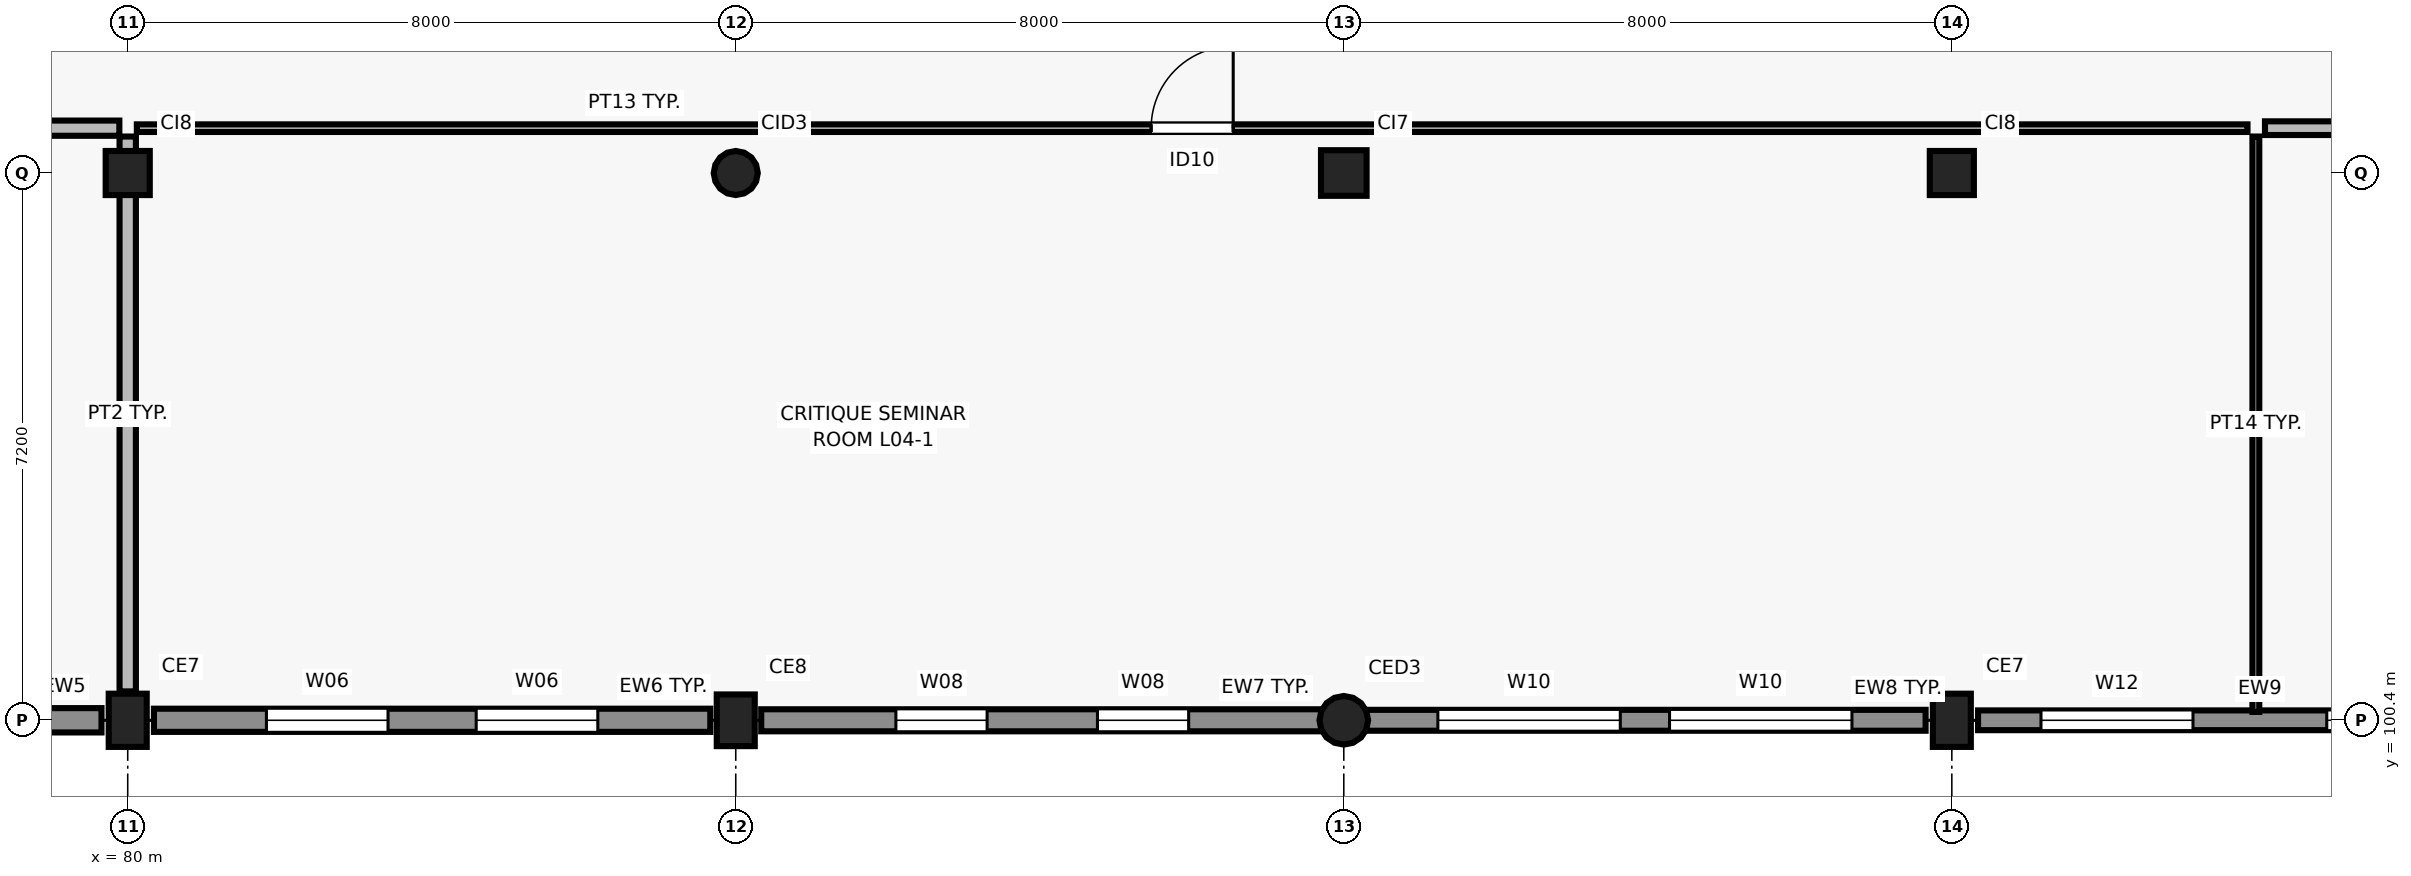
"""IFC4 building model, lengths in metres.
Left out: names, types, materials, properties, quantities, classifications, styles, units other than length and angle.
Written with IfcOpenShell. Run it as: python <this file> out.ifc"""

import sys

from ifc_helpers import new_model, si_unit, direction, frame, frame_2d, origin, origin_2d, place, context, subcontext, project, spatial, rectangle, circle, extrude, element, fill, save


model = new_model("IFC4")
c1 = context("Model", 3, precision=1e-05, world=origin(), true_north=direction((0.0, 1.0)))
c2 = subcontext(c1, "Body", "Model", "MODEL_VIEW")
j1 = project(units=[si_unit("LENGTHUNIT", "METRE"), si_unit("PLANEANGLEUNIT", "RADIAN")], contexts=[c1])
p1 = place(None, origin())
s1 = spatial("IfcSite", under=j1, at=p1, CompositionType="ELEMENT")
p2 = place(p1, origin())
s2 = spatial("IfcBuilding", under=s1, at=p2, CompositionType="ELEMENT")
p3 = place(p2, frame((0.0, 0.0, 17.4)))
s3 = spatial("IfcBuildingStorey", under=s2, at=p3, CompositionType="ELEMENT", Elevation=17.4)
p4 = place(p3, frame((80.0, 100.4, 0.0), z_axis=(0.0, 0.0, 1.0), x_axis=(1.0, 0.0, 0.0)))
e1 = element("IfcColumn", 1, at=p4, inside=s3, PredefinedType="COLUMN", context=c2, shape_type="SweptSolid", body=[
    extrude(rectangle(XDim=0.7, YDim=0.5, at=origin_2d()), origin(), (0.0, 0.0, 1.0), 4.2),
])
p5 = place(p3, frame((80.0, 107.6, 0.0), z_axis=(0.0, 0.0, 1.0), x_axis=(1.0, 0.0, 0.0)))
e2 = element("IfcColumn", 2, at=p5, inside=s3, PredefinedType="COLUMN", context=c2, shape_type="SweptSolid", body=[
    extrude(rectangle(XDim=0.58, YDim=0.58, at=origin_2d()), origin(), (0.0, 0.0, 1.0), 4.2),
])
p6 = place(p3, frame((88.0, 100.4, 0.0), z_axis=(0.0, 0.0, 1.0), x_axis=(1.0, 0.0, 0.0)))
e3 = element("IfcColumn", 3, at=p6, inside=s3, PredefinedType="COLUMN", context=c2, shape_type="SweptSolid", body=[
    extrude(rectangle(XDim=0.68, YDim=0.5, at=origin_2d()), origin(), (0.0, 0.0, 1.0), 4.2),
])
p7 = place(p3, frame((88.0, 107.6, 0.0), z_axis=(0.0, 0.0, 1.0), x_axis=(1.0, 0.0, 0.0)))
e4 = element("IfcColumn", 4, at=p7, inside=s3, PredefinedType="COLUMN", context=c2, shape_type="SweptSolid", body=[
    extrude(circle(Radius=0.29, at=origin_2d()), origin(), (0.0, 0.0, 1.0), 4.2),
])
p8 = place(p3, frame((96.0, 100.4, 0.0), z_axis=(0.0, 0.0, 1.0), x_axis=(1.0, 0.0, 0.0)))
e5 = element("IfcColumn", 5, at=p8, inside=s3, PredefinedType="COLUMN", context=c2, shape_type="SweptSolid", body=[
    extrude(circle(Radius=0.32, at=origin_2d()), origin(), (0.0, 0.0, 1.0), 4.2),
])
p9 = place(p3, frame((96.0, 107.6, 0.0), z_axis=(0.0, 0.0, 1.0), x_axis=(1.0, 0.0, 0.0)))
e6 = element("IfcColumn", 6, at=p9, inside=s3, PredefinedType="COLUMN", context=c2, shape_type="SweptSolid", body=[
    extrude(rectangle(XDim=0.6, YDim=0.6, at=origin_2d()), origin(), (0.0, 0.0, 1.0), 4.2),
])
p10 = place(p3, frame((104.0, 100.4, 0.0), z_axis=(0.0, 0.0, 1.0), x_axis=(1.0, 0.0, 0.0)))
e7 = element("IfcColumn", 7, at=p10, inside=s3, PredefinedType="COLUMN", context=c2, shape_type="SweptSolid", body=[
    extrude(rectangle(XDim=0.7, YDim=0.5, at=origin_2d()), origin(), (0.0, 0.0, 1.0), 4.2),
])
p11 = place(p3, frame((104.0, 107.6, 0.0), z_axis=(0.0, 0.0, 1.0), x_axis=(1.0, 0.0, 0.0)))
e8 = element("IfcColumn", 8, at=p11, inside=s3, PredefinedType="COLUMN", context=c2, shape_type="SweptSolid", body=[
    extrude(rectangle(XDim=0.58, YDim=0.58, at=origin_2d()), origin(), (0.0, 0.0, 1.0), 4.2),
])
p12 = place(p3, frame((72.269, 100.4, 0.0), z_axis=(0.0, 0.0, 1.0), x_axis=(1.0, 0.0, 0.0)))
e9 = element("IfcWall", 9, at=p12, inside=s3, PredefinedType="SOLIDWALL", context=c2, shape_type="SweptSolid", body=[
    extrude(rectangle(XDim=7.386, YDim=0.32, at=frame_2d((3.693, 0.0))), origin(), (0.0, 0.0, 1.0), 3.37),
])
p13 = place(p12, frame((1.235, 0.0, 0.9)))
e10 = element("IfcOpeningElement", 10, at=p13, cuts=e9, PredefinedType="OPENING", context=c2, shape_type="SweptSolid", body=[
    extrude(rectangle(XDim=2.0, YDim=1.8, at=frame_2d((1.0, 0.9))), frame((0.0, 0.17, 0.0), z_axis=(0.0, -1.0, 0.0), x_axis=(1.0, 0.0, 0.0)), (0.0, 0.0, 1.0), 0.34),
])
p14 = place(p12, frame((4.151, 0.0, 0.9)))
e11 = element("IfcOpeningElement", 11, at=p14, cuts=e9, PredefinedType="OPENING", context=c2, shape_type="SweptSolid", body=[
    extrude(rectangle(XDim=2.0, YDim=1.8, at=frame_2d((1.0, 0.9))), frame((0.0, 0.17, 0.0), z_axis=(0.0, -1.0, 0.0), x_axis=(1.0, 0.0, 0.0)), (0.0, 0.0, 1.0), 0.34),
])
p15 = place(p3, frame((80.345, 100.4, 0.0), z_axis=(0.0, 0.0, 1.0), x_axis=(1.0, 0.0, 0.0)))
e12 = element("IfcWall", 12, at=p15, inside=s3, PredefinedType="SOLIDWALL", context=c2, shape_type="SweptSolid", body=[
    extrude(rectangle(XDim=7.32, YDim=0.305, at=frame_2d((3.66, 0.0))), origin(), (0.0, 0.0, 1.0), 3.37),
])
p16 = place(p15, frame((1.48, 0.0, 0.9)))
e13 = element("IfcOpeningElement", 13, at=p16, cuts=e12, PredefinedType="OPENING", context=c2, shape_type="SweptSolid", body=[
    extrude(rectangle(XDim=1.6, YDim=1.8, at=frame_2d((0.8, 0.9))), frame((0.0, 0.162, 0.0), z_axis=(0.0, -1.0, 0.0), x_axis=(1.0, 0.0, 0.0)), (0.0, 0.0, 1.0), 0.325),
])
p17 = place(p15, frame((4.24, 0.0, 0.9)))
e14 = element("IfcOpeningElement", 14, at=p17, cuts=e12, PredefinedType="OPENING", context=c2, shape_type="SweptSolid", body=[
    extrude(rectangle(XDim=1.6, YDim=1.8, at=frame_2d((0.8, 0.9))), frame((0.0, 0.162, 0.0), z_axis=(0.0, -1.0, 0.0), x_axis=(1.0, 0.0, 0.0)), (0.0, 0.0, 1.0), 0.325),
])
p18 = place(p3, frame((88.335, 100.4, 0.0), z_axis=(0.0, 0.0, 1.0), x_axis=(1.0, 0.0, 0.0)))
e15 = element("IfcWall", 15, at=p18, inside=s3, PredefinedType="SOLIDWALL", context=c2, shape_type="SweptSolid", body=[
    extrude(rectangle(XDim=7.396, YDim=0.29, at=frame_2d((3.698, 0.0))), origin(), (0.0, 0.0, 1.0), 3.37),
])
p19 = place(p18, frame((1.772, 0.0, 0.9)))
e16 = element("IfcOpeningElement", 16, at=p19, cuts=e15, PredefinedType="OPENING", context=c2, shape_type="SweptSolid", body=[
    extrude(rectangle(XDim=1.2, YDim=1.8, at=frame_2d((0.6, 0.9))), frame((0.0, 0.155, 0.0), z_axis=(0.0, -1.0, 0.0), x_axis=(1.0, 0.0, 0.0)), (0.0, 0.0, 1.0), 0.31),
])
p20 = place(p18, frame((4.424, 0.0, 0.9)))
e17 = element("IfcOpeningElement", 17, at=p20, cuts=e15, PredefinedType="OPENING", context=c2, shape_type="SweptSolid", body=[
    extrude(rectangle(XDim=1.2, YDim=1.8, at=frame_2d((0.6, 0.9))), frame((0.0, 0.155, 0.0), z_axis=(0.0, -1.0, 0.0), x_axis=(1.0, 0.0, 0.0)), (0.0, 0.0, 1.0), 0.31),
])
p21 = place(p3, frame((96.269, 100.4, 0.0), z_axis=(0.0, 0.0, 1.0), x_axis=(1.0, 0.0, 0.0)))
e18 = element("IfcWall", 18, at=p21, inside=s3, PredefinedType="SOLIDWALL", context=c2, shape_type="SweptSolid", body=[
    extrude(rectangle(XDim=7.386, YDim=0.275, at=frame_2d((3.693, 0.0))), origin(), (0.0, 0.0, 1.0), 3.47),
])
p22 = place(p21, frame((0.969, 0.0, 0.9)))
e19 = element("IfcOpeningElement", 19, at=p22, cuts=e18, PredefinedType="OPENING", context=c2, shape_type="SweptSolid", body=[
    extrude(rectangle(XDim=2.4, YDim=1.5, at=frame_2d((1.2, 0.75))), frame((0.0, 0.147, 0.0), z_axis=(0.0, -1.0, 0.0), x_axis=(1.0, 0.0, 0.0)), (0.0, 0.0, 1.0), 0.295),
])
p23 = place(p21, frame((4.017, 0.0, 0.9)))
e20 = element("IfcOpeningElement", 20, at=p23, cuts=e18, PredefinedType="OPENING", context=c2, shape_type="SweptSolid", body=[
    extrude(rectangle(XDim=2.4, YDim=1.5, at=frame_2d((1.2, 0.75))), frame((0.0, 0.147, 0.0), z_axis=(0.0, -1.0, 0.0), x_axis=(1.0, 0.0, 0.0)), (0.0, 0.0, 1.0), 0.295),
])
p24 = place(p3, frame((104.345, 100.4, 0.0), z_axis=(0.0, 0.0, 1.0), x_axis=(1.0, 0.0, 0.0)))
e21 = element("IfcWall", 21, at=p24, inside=s3, PredefinedType="SOLIDWALL", context=c2, shape_type="SweptSolid", body=[
    extrude(rectangle(XDim=7.32, YDim=0.26, at=frame_2d((3.66, 0.0))), origin(), (0.0, 0.0, 1.0), 3.37),
])
p25 = place(p24, frame((0.828, 0.0, 0.9)))
e22 = element("IfcOpeningElement", 22, at=p25, cuts=e21, PredefinedType="OPENING", context=c2, shape_type="SweptSolid", body=[
    extrude(rectangle(XDim=2.0, YDim=1.5, at=frame_2d((1.0, 0.75))), frame((0.0, 0.14, 0.0), z_axis=(0.0, -1.0, 0.0), x_axis=(1.0, 0.0, 0.0)), (0.0, 0.0, 1.0), 0.28),
])
p26 = place(p24, frame((4.588, 0.0, 0.9)))
e23 = element("IfcOpeningElement", 23, at=p26, cuts=e21, PredefinedType="OPENING", context=c2, shape_type="SweptSolid", body=[
    extrude(rectangle(XDim=1.8, YDim=1.5, at=frame_2d((0.9, 0.75))), frame((0.0, 0.14, 0.0), z_axis=(0.0, -1.0, 0.0), x_axis=(1.0, 0.0, 0.0)), (0.0, 0.0, 1.0), 0.28),
])
p27 = place(p3, frame((48.11, 108.19, 0.0), z_axis=(0.0, 0.0, 1.0), x_axis=(1.0, 0.0, 0.0)))
e24 = element("IfcWall", 24, at=p27, inside=s3, PredefinedType="SOLIDWALL", context=c2, shape_type="SweptSolid", body=[
    extrude(rectangle(XDim=31.78, YDim=0.2, at=frame_2d((15.89, 0.0))), origin(), (0.0, 0.0, 1.0), 3.9),
])
p28 = place(p27, frame((12.708, 0.0, 0.0)))
e25 = element("IfcOpeningElement", 25, at=p28, cuts=e24, PredefinedType="OPENING", context=c2, shape_type="SweptSolid", body=[
    extrude(rectangle(XDim=1.28, YDim=2.2, at=frame_2d((0.64, 1.1))), frame((0.0, 0.11, 0.0), z_axis=(0.0, -1.0, 0.0), x_axis=(1.0, 0.0, 0.0)), (0.0, 0.0, 1.0), 0.22),
])
p29 = place(p3, frame((80.0, 100.78, 0.0), z_axis=(0.0, 0.0, 1.0), x_axis=(0.0, 1.0, 0.0)))
e26 = element("IfcWall", 26, at=p29, inside=s3, PredefinedType="PARTITIONING", context=c2, shape_type="SweptSolid", body=[
    extrude(rectangle(XDim=7.3, YDim=0.215, at=frame_2d((3.65, 0.0))), origin(), (0.0, 0.0, 1.0), 3.39),
])
p30 = place(p3, frame((80.12, 108.19, 0.0), z_axis=(0.0, 0.0, 1.0), x_axis=(1.0, 0.0, 0.0)))
e27 = element("IfcWall", 27, at=p30, inside=s3, PredefinedType="PARTITIONING", context=c2, shape_type="SweptSolid", body=[
    extrude(rectangle(XDim=27.77, YDim=0.1, at=frame_2d((13.885, 0.0))), origin(), (0.0, 0.0, 1.0), 3.9),
])
p31 = place(p30, frame((13.345, 0.0, 0.0)))
e28 = element("IfcOpeningElement", 28, at=p31, cuts=e27, PredefinedType="OPENING", context=c2, shape_type="SweptSolid", body=[
    extrude(rectangle(XDim=1.08, YDim=2.15, at=frame_2d((0.54, 1.075))), frame((0.0, 0.06, 0.0), z_axis=(0.0, -1.0, 0.0), x_axis=(1.0, 0.0, 0.0)), (0.0, 0.0, 1.0), 0.12),
])
p32 = place(p3, frame((108.0, 100.51, 0.0), z_axis=(0.0, 0.0, 1.0), x_axis=(0.0, 1.0, 0.0)))
e29 = element("IfcWall", 29, at=p32, inside=s3, PredefinedType="PARTITIONING", context=c2, shape_type="SweptSolid", body=[
    extrude(rectangle(XDim=7.57, YDim=0.09, at=frame_2d((3.785, 0.0))), origin(), (0.0, 0.0, 1.0), 3.9),
])
p33 = place(p3, frame((108.12, 108.19, 0.0), z_axis=(0.0, 0.0, 1.0), x_axis=(1.0, 0.0, 0.0)))
e30 = element("IfcWall", 30, at=p33, inside=s3, PredefinedType="PARTITIONING", context=c2, shape_type="SweptSolid", body=[
    extrude(rectangle(XDim=11.88, YDim=0.18, at=frame_2d((5.94, 0.0))), origin(), (0.0, 0.0, 1.0), 3.9),
])
p34 = place(p33, frame((5.42, 0.0, 0.0)))
e31 = element("IfcOpeningElement", 31, at=p34, cuts=e30, PredefinedType="OPENING", context=c2, shape_type="SweptSolid", body=[
    extrude(rectangle(XDim=1.04, YDim=2.15, at=frame_2d((0.52, 1.075))), frame((0.0, 0.1, 0.0), z_axis=(0.0, -1.0, 0.0), x_axis=(1.0, 0.0, 0.0)), (0.0, 0.0, 1.0), 0.2),
])
p35 = place(p16, origin())
e32 = element("IfcWindow", 32, at=p35, inside=s3, PartitioningType="SINGLE_PANEL", PredefinedType="WINDOW", context=c2, shape_type="SweptSolid", body=[
    extrude(rectangle(XDim=1.6, YDim=1.8, at=frame_2d((0.8, 0.9))), frame((0.0, 0.03, 0.0), z_axis=(0.0, -1.0, 0.0), x_axis=(1.0, 0.0, 0.0)), (0.0, 0.0, 1.0), 0.06),
])
fill(e13, e32)
p36 = place(p17, origin())
e33 = element("IfcWindow", 33, at=p36, inside=s3, PartitioningType="SINGLE_PANEL", PredefinedType="WINDOW", context=c2, shape_type="SweptSolid", body=[
    extrude(rectangle(XDim=1.6, YDim=1.8, at=frame_2d((0.8, 0.9))), frame((0.0, 0.03, 0.0), z_axis=(0.0, -1.0, 0.0), x_axis=(1.0, 0.0, 0.0)), (0.0, 0.0, 1.0), 0.06),
])
fill(e14, e33)
p37 = place(p19, origin())
e34 = element("IfcWindow", 34, at=p37, inside=s3, PartitioningType="SINGLE_PANEL", PredefinedType="WINDOW", context=c2, shape_type="SweptSolid", body=[
    extrude(rectangle(XDim=1.2, YDim=1.8, at=frame_2d((0.6, 0.9))), frame((0.0, 0.03, 0.0), z_axis=(0.0, -1.0, 0.0), x_axis=(1.0, 0.0, 0.0)), (0.0, 0.0, 1.0), 0.06),
])
fill(e16, e34)
p38 = place(p20, origin())
e35 = element("IfcWindow", 35, at=p38, inside=s3, PartitioningType="SINGLE_PANEL", PredefinedType="WINDOW", context=c2, shape_type="SweptSolid", body=[
    extrude(rectangle(XDim=1.2, YDim=1.8, at=frame_2d((0.6, 0.9))), frame((0.0, 0.03, 0.0), z_axis=(0.0, -1.0, 0.0), x_axis=(1.0, 0.0, 0.0)), (0.0, 0.0, 1.0), 0.06),
])
fill(e17, e35)
p39 = place(p22, origin())
e36 = element("IfcWindow", 36, at=p39, inside=s3, PartitioningType="SINGLE_PANEL", PredefinedType="WINDOW", context=c2, shape_type="SweptSolid", body=[
    extrude(rectangle(XDim=2.4, YDim=1.5, at=frame_2d((1.2, 0.75))), frame((0.0, 0.03, 0.0), z_axis=(0.0, -1.0, 0.0), x_axis=(1.0, 0.0, 0.0)), (0.0, 0.0, 1.0), 0.06),
])
fill(e19, e36)
p40 = place(p23, origin())
e37 = element("IfcWindow", 37, at=p40, inside=s3, PartitioningType="SINGLE_PANEL", PredefinedType="WINDOW", context=c2, shape_type="SweptSolid", body=[
    extrude(rectangle(XDim=2.4, YDim=1.5, at=frame_2d((1.2, 0.75))), frame((0.0, 0.03, 0.0), z_axis=(0.0, -1.0, 0.0), x_axis=(1.0, 0.0, 0.0)), (0.0, 0.0, 1.0), 0.06),
])
fill(e20, e37)
p41 = place(p25, origin())
e38 = element("IfcWindow", 38, at=p41, inside=s3, PartitioningType="SINGLE_PANEL", PredefinedType="WINDOW", context=c2, shape_type="SweptSolid", body=[
    extrude(rectangle(XDim=2.0, YDim=1.5, at=frame_2d((1.0, 0.75))), frame((0.0, 0.03, 0.0), z_axis=(0.0, -1.0, 0.0), x_axis=(1.0, 0.0, 0.0)), (0.0, 0.0, 1.0), 0.06),
])
fill(e22, e38)
p42 = place(p26, origin())
e39 = element("IfcWindow", 39, at=p42, inside=s3, PartitioningType="SINGLE_PANEL", PredefinedType="WINDOW", context=c2, shape_type="SweptSolid", body=[
    extrude(rectangle(XDim=1.8, YDim=1.5, at=frame_2d((0.9, 0.75))), frame((0.0, 0.03, 0.0), z_axis=(0.0, -1.0, 0.0), x_axis=(1.0, 0.0, 0.0)), (0.0, 0.0, 1.0), 0.06),
])
fill(e23, e39)
p43 = place(p31, origin())
e40 = element("IfcDoor", 40, at=p43, inside=s3, OperationType="SINGLE_SWING_RIGHT", PredefinedType="DOOR", context=c2, shape_type="SweptSolid", body=[
    extrude(rectangle(XDim=1.08, YDim=2.15, at=frame_2d((0.54, 1.075))), frame((0.0, 0.025, 0.0), z_axis=(0.0, -1.0, 0.0), x_axis=(1.0, 0.0, 0.0)), (0.0, 0.0, 1.0), 0.05),
])
fill(e28, e40)
save(model, sys.argv[1])
